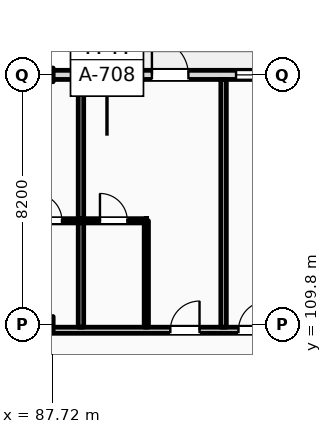
"""IFC4 building model, lengths in metres.
Left out: names, types, materials, properties, quantities, classifications, styles, units other than length and angle.
Written with IfcOpenShell. Run it as: python <this file> out.ifc"""

import sys

from ifc_helpers import new_model, si_unit, direction, frame, frame_2d, origin, origin_2d, place, context, subcontext, project, spatial, rectangle, i_section, extrude, element, fill, save


model = new_model("IFC4")
c1 = context("Model", 3, precision=1e-05, world=origin(), true_north=direction((0.0, 1.0)))
c2 = subcontext(c1, "Body", "Model", "MODEL_VIEW")
j1 = project(units=[si_unit("LENGTHUNIT", "METRE"), si_unit("PLANEANGLEUNIT", "RADIAN")], contexts=[c1])
p1 = place(None, origin())
s1 = spatial("IfcSite", under=j1, at=p1, CompositionType="ELEMENT")
p2 = place(p1, origin())
s2 = spatial("IfcBuilding", under=s1, at=p2, CompositionType="ELEMENT")
p3 = place(p2, frame((0.0, 0.0, 28.2)))
s3 = spatial("IfcBuildingStorey", under=s2, at=p3, CompositionType="ELEMENT", Elevation=28.2)
p4 = place(p3, frame((87.6, 109.8, 0.0), z_axis=(0.0, 0.0, 1.0), x_axis=(1.0, 0.0, 0.0)))
e1 = element("IfcColumn", 1, at=p4, inside=s3, PredefinedType="COLUMN", context=c2, shape_type="SweptSolid", body=[
    extrude(i_section(OverallWidth=0.3, OverallDepth=0.5, WebThickness=0.014, FlangeThickness=0.028, FilletRadius=0.027, at=origin_2d()), origin(), (0.0, 0.0, 1.0), 3.6),
])
p5 = place(p3, frame((87.6, 118.0, 0.0), z_axis=(0.0, 0.0, 1.0), x_axis=(1.0, 0.0, 0.0)))
e2 = element("IfcColumn", 2, at=p5, inside=s3, PredefinedType="COLUMN", context=c2, shape_type="SweptSolid", body=[
    extrude(i_section(OverallWidth=0.3, OverallDepth=0.45, WebThickness=0.014, FlangeThickness=0.026, FilletRadius=0.027, at=origin_2d()), origin(), (0.0, 0.0, 1.0), 3.6),
])
p6 = place(p3, frame((22.5, 118.0, 0.0), z_axis=(0.0, 0.0, 1.0), x_axis=(1.0, 0.0, 0.0)))
e3 = element("IfcWall", 3, at=p6, inside=s3, PredefinedType="STANDARD", context=c2, shape_type="SweptSolid", body=[
    extrude(rectangle(XDim=97.5, YDim=0.3, at=frame_2d((48.75, 0.0))), origin(), (0.0, 0.0, 1.0), 2.8),
])
p7 = place(p6, frame((0.91, 0.0, 0.9)))
e4 = element("IfcOpeningElement", 4, at=p7, cuts=e3, PredefinedType="OPENING", context=c2, shape_type="SweptSolid", body=[
    extrude(rectangle(XDim=0.9, YDim=1.72, at=frame_2d((0.45, 0.86))), frame((0.0, 0.16, 0.0), z_axis=(0.0, -1.0, 0.0), x_axis=(1.0, 0.0, 0.0)), (0.0, 0.0, 1.0), 0.32),
])
p8 = place(p6, frame((6.561, 0.0, 0.0)))
e5 = element("IfcOpeningElement", 5, at=p8, cuts=e3, PredefinedType="OPENING", context=c2, shape_type="SweptSolid", body=[
    extrude(rectangle(XDim=1.2, YDim=2.25, at=frame_2d((0.6, 1.125))), frame((0.0, 0.16, 0.0), z_axis=(0.0, -1.0, 0.0), x_axis=(1.0, 0.0, 0.0)), (0.0, 0.0, 1.0), 0.32),
])
p9 = place(p6, frame((11.477, 0.0, 0.9)))
e6 = element("IfcOpeningElement", 6, at=p9, cuts=e3, PredefinedType="OPENING", context=c2, shape_type="SweptSolid", body=[
    extrude(rectangle(XDim=1.1, YDim=1.5, at=frame_2d((0.55, 0.75))), frame((0.0, 0.16, 0.0), z_axis=(0.0, -1.0, 0.0), x_axis=(1.0, 0.0, 0.0)), (0.0, 0.0, 1.0), 0.32),
])
p10 = place(p6, frame((15.194, 0.0, 0.9)))
e7 = element("IfcOpeningElement", 7, at=p10, cuts=e3, PredefinedType="OPENING", context=c2, shape_type="SweptSolid", body=[
    extrude(rectangle(XDim=1.25, YDim=1.6, at=frame_2d((0.625, 0.8))), frame((0.0, 0.16, 0.0), z_axis=(0.0, -1.0, 0.0), x_axis=(1.0, 0.0, 0.0)), (0.0, 0.0, 1.0), 0.32),
])
p11 = place(p6, frame((19.509, 0.0, 0.9)))
e8 = element("IfcOpeningElement", 8, at=p11, cuts=e3, PredefinedType="OPENING", context=c2, shape_type="SweptSolid", body=[
    extrude(rectangle(XDim=1.4, YDim=1.7, at=frame_2d((0.7, 0.85))), frame((0.0, 0.16, 0.0), z_axis=(0.0, -1.0, 0.0), x_axis=(1.0, 0.0, 0.0)), (0.0, 0.0, 1.0), 0.32),
])
p12 = place(p6, frame((23.258, 0.0, 0.0)))
e9 = element("IfcOpeningElement", 9, at=p12, cuts=e3, PredefinedType="OPENING", context=c2, shape_type="SweptSolid", body=[
    extrude(rectangle(XDim=1.2, YDim=2.25, at=frame_2d((0.6, 1.125))), frame((0.0, 0.16, 0.0), z_axis=(0.0, -1.0, 0.0), x_axis=(1.0, 0.0, 0.0)), (0.0, 0.0, 1.0), 0.32),
])
p13 = place(p6, frame((28.115, 0.0, 0.9)))
e10 = element("IfcOpeningElement", 10, at=p13, cuts=e3, PredefinedType="OPENING", context=c2, shape_type="SweptSolid", body=[
    extrude(rectangle(XDim=1.75, YDim=1.72, at=frame_2d((0.875, 0.86))), frame((0.0, 0.16, 0.0), z_axis=(0.0, -1.0, 0.0), x_axis=(1.0, 0.0, 0.0)), (0.0, 0.0, 1.0), 0.32),
])
p14 = place(p6, frame((31.582, 0.0, 0.9)))
e11 = element("IfcOpeningElement", 11, at=p14, cuts=e3, PredefinedType="OPENING", context=c2, shape_type="SweptSolid", body=[
    extrude(rectangle(XDim=1.35, YDim=1.72, at=frame_2d((0.675, 0.86))), frame((0.0, 0.16, 0.0), z_axis=(0.0, -1.0, 0.0), x_axis=(1.0, 0.0, 0.0)), (0.0, 0.0, 1.0), 0.32),
])
p15 = place(p6, frame((37.379, 0.0, 0.0)))
e12 = element("IfcOpeningElement", 12, at=p15, cuts=e3, PredefinedType="OPENING", context=c2, shape_type="SweptSolid", body=[
    extrude(rectangle(XDim=1.2, YDim=2.25, at=frame_2d((0.6, 1.125))), frame((0.0, 0.16, 0.0), z_axis=(0.0, -1.0, 0.0), x_axis=(1.0, 0.0, 0.0)), (0.0, 0.0, 1.0), 0.32),
])
p16 = place(p6, frame((42.663, 0.0, 0.9)))
e13 = element("IfcOpeningElement", 13, at=p16, cuts=e3, PredefinedType="OPENING", context=c2, shape_type="SweptSolid", body=[
    extrude(rectangle(XDim=1.35, YDim=1.72, at=frame_2d((0.675, 0.86))), frame((0.0, 0.16, 0.0), z_axis=(0.0, -1.0, 0.0), x_axis=(1.0, 0.0, 0.0)), (0.0, 0.0, 1.0), 0.32),
])
p17 = place(p6, frame((45.119, 0.0, 0.9)))
e14 = element("IfcOpeningElement", 14, at=p17, cuts=e3, PredefinedType="OPENING", context=c2, shape_type="SweptSolid", body=[
    extrude(rectangle(XDim=2.871, YDim=1.72, at=frame_2d((1.436, 0.86))), frame((0.0, 0.16, 0.0), z_axis=(0.0, -1.0, 0.0), x_axis=(1.0, 0.0, 0.0)), (0.0, 0.0, 1.0), 0.32),
])
p18 = place(p6, frame((50.41, 0.0, 0.9)))
e15 = element("IfcOpeningElement", 15, at=p18, cuts=e3, PredefinedType="OPENING", context=c2, shape_type="SweptSolid", body=[
    extrude(rectangle(XDim=1.8, YDim=1.72, at=frame_2d((0.9, 0.86))), frame((0.0, 0.16, 0.0), z_axis=(0.0, -1.0, 0.0), x_axis=(1.0, 0.0, 0.0)), (0.0, 0.0, 1.0), 0.32),
])
p19 = place(p6, frame((54.375, 0.0, 0.0)))
e16 = element("IfcOpeningElement", 16, at=p19, cuts=e3, PredefinedType="OPENING", context=c2, shape_type="SweptSolid", body=[
    extrude(rectangle(XDim=1.2, YDim=2.25, at=frame_2d((0.6, 1.125))), frame((0.0, 0.16, 0.0), z_axis=(0.0, -1.0, 0.0), x_axis=(1.0, 0.0, 0.0)), (0.0, 0.0, 1.0), 0.32),
])
p20 = place(p6, frame((59.052, 0.0, 0.9)))
e17 = element("IfcOpeningElement", 17, at=p20, cuts=e3, PredefinedType="OPENING", context=c2, shape_type="SweptSolid", body=[
    extrude(rectangle(XDim=1.35, YDim=1.72, at=frame_2d((0.675, 0.86))), frame((0.0, 0.16, 0.0), z_axis=(0.0, -1.0, 0.0), x_axis=(1.0, 0.0, 0.0)), (0.0, 0.0, 1.0), 0.32),
])
p21 = place(p6, frame((62.768, 0.0, 0.9)))
e18 = element("IfcOpeningElement", 18, at=p21, cuts=e3, PredefinedType="OPENING", context=c2, shape_type="SweptSolid", body=[
    extrude(rectangle(XDim=1.5, YDim=1.72, at=frame_2d((0.75, 0.86))), frame((0.0, 0.16, 0.0), z_axis=(0.0, -1.0, 0.0), x_axis=(1.0, 0.0, 0.0)), (0.0, 0.0, 1.0), 0.32),
])
p22 = place(p6, frame((68.498, 0.0, 0.0)))
e19 = element("IfcOpeningElement", 19, at=p22, cuts=e3, PredefinedType="OPENING", context=c2, shape_type="SweptSolid", body=[
    extrude(rectangle(XDim=1.2, YDim=2.25, at=frame_2d((0.6, 1.125))), frame((0.0, 0.16, 0.0), z_axis=(0.0, -1.0, 0.0), x_axis=(1.0, 0.0, 0.0)), (0.0, 0.0, 1.0), 0.32),
])
p23 = place(p6, frame((71.265, 0.0, 0.9)))
e20 = element("IfcOpeningElement", 20, at=p23, cuts=e3, PredefinedType="OPENING", context=c2, shape_type="SweptSolid", body=[
    extrude(rectangle(XDim=0.9, YDim=1.72, at=frame_2d((0.45, 0.86))), frame((0.0, 0.16, 0.0), z_axis=(0.0, -1.0, 0.0), x_axis=(1.0, 0.0, 0.0)), (0.0, 0.0, 1.0), 0.32),
])
p24 = place(p6, frame((76.316, 0.0, 0.9)))
e21 = element("IfcOpeningElement", 21, at=p24, cuts=e3, PredefinedType="OPENING", context=c2, shape_type="SweptSolid", body=[
    extrude(rectangle(XDim=1.95, YDim=1.72, at=frame_2d((0.975, 0.86))), frame((0.0, 0.16, 0.0), z_axis=(0.0, -1.0, 0.0), x_axis=(1.0, 0.0, 0.0)), (0.0, 0.0, 1.0), 0.32),
])
p25 = place(p6, frame((81.632, 0.0, 0.9)))
e22 = element("IfcOpeningElement", 22, at=p25, cuts=e3, PredefinedType="OPENING", context=c2, shape_type="SweptSolid", body=[
    extrude(rectangle(XDim=1.35, YDim=1.72, at=frame_2d((0.675, 0.86))), frame((0.0, 0.16, 0.0), z_axis=(0.0, -1.0, 0.0), x_axis=(1.0, 0.0, 0.0)), (0.0, 0.0, 1.0), 0.32),
])
p26 = place(p6, frame((84.948, 0.0, 0.9)))
e23 = element("IfcOpeningElement", 23, at=p26, cuts=e3, PredefinedType="OPENING", context=c2, shape_type="SweptSolid", body=[
    extrude(rectangle(XDim=2.25, YDim=1.72, at=frame_2d((1.125, 0.86))), frame((0.0, 0.16, 0.0), z_axis=(0.0, -1.0, 0.0), x_axis=(1.0, 0.0, 0.0)), (0.0, 0.0, 1.0), 0.32),
])
p27 = place(p6, frame((90.063, 0.0, 0.9)))
e24 = element("IfcOpeningElement", 24, at=p27, cuts=e3, PredefinedType="OPENING", context=c2, shape_type="SweptSolid", body=[
    extrude(rectangle(XDim=1.8, YDim=1.72, at=frame_2d((0.9, 0.86))), frame((0.0, 0.16, 0.0), z_axis=(0.0, -1.0, 0.0), x_axis=(1.0, 0.0, 0.0)), (0.0, 0.0, 1.0), 0.32),
])
p28 = place(p6, frame((93.529, 0.0, 0.9)))
e25 = element("IfcOpeningElement", 25, at=p28, cuts=e3, PredefinedType="OPENING", context=c2, shape_type="SweptSolid", body=[
    extrude(rectangle(XDim=2.55, YDim=1.72, at=frame_2d((1.275, 0.86))), frame((0.0, 0.16, 0.0), z_axis=(0.0, -1.0, 0.0), x_axis=(1.0, 0.0, 0.0)), (0.0, 0.0, 1.0), 0.32),
])
p29 = place(p3, frame((10.65, 109.6, 0.0), z_axis=(0.0, 0.0, 1.0), x_axis=(1.0, 0.0, 0.0)))
e26 = element("IfcWall", 26, at=p29, inside=s3, PredefinedType="PARTITIONING", context=c2, shape_type="SweptSolid", body=[
    extrude(rectangle(XDim=109.21, YDim=0.2, at=frame_2d((54.605, 0.0))), origin(), (0.0, 0.0, 1.0), 2.8),
])
p30 = place(p29, frame((12.611, 0.0, 0.0)))
e27 = element("IfcOpeningElement", 27, at=p30, cuts=e26, PredefinedType="OPENING", context=c2, shape_type="SweptSolid", body=[
    extrude(rectangle(XDim=1.02, YDim=2.2, at=frame_2d((0.51, 1.1))), frame((0.0, 0.11, 0.0), z_axis=(0.0, -1.0, 0.0), x_axis=(1.0, 0.0, 0.0)), (0.0, 0.0, 1.0), 0.22),
])
p31 = place(p29, frame((19.451, 0.0, 0.0)))
e28 = element("IfcOpeningElement", 28, at=p31, cuts=e26, PredefinedType="OPENING", context=c2, shape_type="SweptSolid", body=[
    extrude(rectangle(XDim=1.02, YDim=2.2, at=frame_2d((0.51, 1.1))), frame((0.0, 0.11, 0.0), z_axis=(0.0, -1.0, 0.0), x_axis=(1.0, 0.0, 0.0)), (0.0, 0.0, 1.0), 0.22),
])
p32 = place(p29, frame((23.842, 0.0, 0.0)))
e29 = element("IfcOpeningElement", 29, at=p32, cuts=e26, PredefinedType="OPENING", context=c2, shape_type="SweptSolid", body=[
    extrude(rectangle(XDim=1.02, YDim=2.2, at=frame_2d((0.51, 1.1))), frame((0.0, 0.11, 0.0), z_axis=(0.0, -1.0, 0.0), x_axis=(1.0, 0.0, 0.0)), (0.0, 0.0, 1.0), 0.22),
])
p33 = place(p29, frame((26.084, 0.0, 0.0)))
e30 = element("IfcOpeningElement", 30, at=p33, cuts=e26, PredefinedType="OPENING", context=c2, shape_type="SweptSolid", body=[
    extrude(rectangle(XDim=1.02, YDim=2.2, at=frame_2d((0.51, 1.1))), frame((0.0, 0.11, 0.0), z_axis=(0.0, -1.0, 0.0), x_axis=(1.0, 0.0, 0.0)), (0.0, 0.0, 1.0), 0.22),
])
p34 = place(p29, frame((32.655, 0.0, 0.0)))
e31 = element("IfcOpeningElement", 31, at=p34, cuts=e26, PredefinedType="OPENING", context=c2, shape_type="SweptSolid", body=[
    extrude(rectangle(XDim=0.96, YDim=2.2, at=frame_2d((0.48, 1.1))), frame((0.0, 0.11, 0.0), z_axis=(0.0, -1.0, 0.0), x_axis=(1.0, 0.0, 0.0)), (0.0, 0.0, 1.0), 0.22),
])
p35 = place(p29, frame((34.895, 0.0, 0.0)))
e32 = element("IfcOpeningElement", 32, at=p35, cuts=e26, PredefinedType="OPENING", context=c2, shape_type="SweptSolid", body=[
    extrude(rectangle(XDim=0.96, YDim=2.2, at=frame_2d((0.48, 1.1))), frame((0.0, 0.11, 0.0), z_axis=(0.0, -1.0, 0.0), x_axis=(1.0, 0.0, 0.0)), (0.0, 0.0, 1.0), 0.22),
])
p36 = place(p29, frame((41.436, 0.0, 0.0)))
e33 = element("IfcOpeningElement", 33, at=p36, cuts=e26, PredefinedType="OPENING", context=c2, shape_type="SweptSolid", body=[
    extrude(rectangle(XDim=0.96, YDim=2.2, at=frame_2d((0.48, 1.1))), frame((0.0, 0.11, 0.0), z_axis=(0.0, -1.0, 0.0), x_axis=(1.0, 0.0, 0.0)), (0.0, 0.0, 1.0), 0.22),
])
p37 = place(p29, frame((43.427, 0.0, 0.0)))
e34 = element("IfcOpeningElement", 34, at=p37, cuts=e26, PredefinedType="OPENING", context=c2, shape_type="SweptSolid", body=[
    extrude(rectangle(XDim=0.96, YDim=2.2, at=frame_2d((0.48, 1.1))), frame((0.0, 0.11, 0.0), z_axis=(0.0, -1.0, 0.0), x_axis=(1.0, 0.0, 0.0)), (0.0, 0.0, 1.0), 0.22),
])
p38 = place(p29, frame((50.218, 0.0, 0.0)))
e35 = element("IfcOpeningElement", 35, at=p38, cuts=e26, PredefinedType="OPENING", context=c2, shape_type="SweptSolid", body=[
    extrude(rectangle(XDim=0.96, YDim=2.2, at=frame_2d((0.48, 1.1))), frame((0.0, 0.11, 0.0), z_axis=(0.0, -1.0, 0.0), x_axis=(1.0, 0.0, 0.0)), (0.0, 0.0, 1.0), 0.22),
])
p39 = place(p29, frame((54.859, 0.0, 0.0)))
e36 = element("IfcOpeningElement", 36, at=p39, cuts=e26, PredefinedType="OPENING", context=c2, shape_type="SweptSolid", body=[
    extrude(rectangle(XDim=0.96, YDim=2.2, at=frame_2d((0.48, 1.1))), frame((0.0, 0.11, 0.0), z_axis=(0.0, -1.0, 0.0), x_axis=(1.0, 0.0, 0.0)), (0.0, 0.0, 1.0), 0.22),
])
p40 = place(p29, frame((59.0, 0.0, 0.0)))
e37 = element("IfcOpeningElement", 37, at=p40, cuts=e26, PredefinedType="OPENING", context=c2, shape_type="SweptSolid", body=[
    extrude(rectangle(XDim=0.96, YDim=2.2, at=frame_2d((0.48, 1.1))), frame((0.0, 0.11, 0.0), z_axis=(0.0, -1.0, 0.0), x_axis=(1.0, 0.0, 0.0)), (0.0, 0.0, 1.0), 0.22),
])
p41 = place(p29, frame((63.39, 0.0, 0.0)))
e38 = element("IfcOpeningElement", 38, at=p41, cuts=e26, PredefinedType="OPENING", context=c2, shape_type="SweptSolid", body=[
    extrude(rectangle(XDim=0.96, YDim=2.2, at=frame_2d((0.48, 1.1))), frame((0.0, 0.11, 0.0), z_axis=(0.0, -1.0, 0.0), x_axis=(1.0, 0.0, 0.0)), (0.0, 0.0, 1.0), 0.22),
])
p42 = place(p29, frame((65.631, 0.0, 0.0)))
e39 = element("IfcOpeningElement", 39, at=p42, cuts=e26, PredefinedType="OPENING", context=c2, shape_type="SweptSolid", body=[
    extrude(rectangle(XDim=0.96, YDim=2.2, at=frame_2d((0.48, 1.1))), frame((0.0, 0.11, 0.0), z_axis=(0.0, -1.0, 0.0), x_axis=(1.0, 0.0, 0.0)), (0.0, 0.0, 1.0), 0.22),
])
p43 = place(p29, frame((72.172, 0.0, 0.0)))
e40 = element("IfcOpeningElement", 40, at=p43, cuts=e26, PredefinedType="OPENING", context=c2, shape_type="SweptSolid", body=[
    extrude(rectangle(XDim=0.96, YDim=2.2, at=frame_2d((0.48, 1.1))), frame((0.0, 0.11, 0.0), z_axis=(0.0, -1.0, 0.0), x_axis=(1.0, 0.0, 0.0)), (0.0, 0.0, 1.0), 0.22),
])
p44 = place(p29, frame((74.413, 0.0, 0.0)))
e41 = element("IfcOpeningElement", 41, at=p44, cuts=e26, PredefinedType="OPENING", context=c2, shape_type="SweptSolid", body=[
    extrude(rectangle(XDim=0.96, YDim=2.2, at=frame_2d((0.48, 1.1))), frame((0.0, 0.11, 0.0), z_axis=(0.0, -1.0, 0.0), x_axis=(1.0, 0.0, 0.0)), (0.0, 0.0, 1.0), 0.22),
])
p45 = place(p29, frame((80.954, 0.0, 0.0)))
e42 = element("IfcOpeningElement", 42, at=p45, cuts=e26, PredefinedType="OPENING", context=c2, shape_type="SweptSolid", body=[
    extrude(rectangle(XDim=0.96, YDim=2.2, at=frame_2d((0.48, 1.1))), frame((0.0, 0.11, 0.0), z_axis=(0.0, -1.0, 0.0), x_axis=(1.0, 0.0, 0.0)), (0.0, 0.0, 1.0), 0.22),
])
p46 = place(p29, frame((83.195, 0.0, 0.0)))
e43 = element("IfcOpeningElement", 43, at=p46, cuts=e26, PredefinedType="OPENING", context=c2, shape_type="SweptSolid", body=[
    extrude(rectangle(XDim=0.96, YDim=2.2, at=frame_2d((0.48, 1.1))), frame((0.0, 0.11, 0.0), z_axis=(0.0, -1.0, 0.0), x_axis=(1.0, 0.0, 0.0)), (0.0, 0.0, 1.0), 0.22),
])
p47 = place(p29, frame((89.735, 0.0, 0.0)))
e44 = element("IfcOpeningElement", 44, at=p47, cuts=e26, PredefinedType="OPENING", context=c2, shape_type="SweptSolid", body=[
    extrude(rectangle(XDim=0.96, YDim=2.2, at=frame_2d((0.48, 1.1))), frame((0.0, 0.11, 0.0), z_axis=(0.0, -1.0, 0.0), x_axis=(1.0, 0.0, 0.0)), (0.0, 0.0, 1.0), 0.22),
])
p48 = place(p29, frame((94.126, 0.0, 0.0)))
e45 = element("IfcOpeningElement", 45, at=p48, cuts=e26, PredefinedType="OPENING", context=c2, shape_type="SweptSolid", body=[
    extrude(rectangle(XDim=0.96, YDim=2.2, at=frame_2d((0.48, 1.1))), frame((0.0, 0.11, 0.0), z_axis=(0.0, -1.0, 0.0), x_axis=(1.0, 0.0, 0.0)), (0.0, 0.0, 1.0), 0.22),
])
p49 = place(p29, frame((98.517, 0.0, 0.0)))
e46 = element("IfcOpeningElement", 46, at=p49, cuts=e26, PredefinedType="OPENING", context=c2, shape_type="SweptSolid", body=[
    extrude(rectangle(XDim=0.96, YDim=2.2, at=frame_2d((0.48, 1.1))), frame((0.0, 0.11, 0.0), z_axis=(0.0, -1.0, 0.0), x_axis=(1.0, 0.0, 0.0)), (0.0, 0.0, 1.0), 0.22),
])
p50 = place(p29, frame((102.908, 0.0, 0.0)))
e47 = element("IfcOpeningElement", 47, at=p50, cuts=e26, PredefinedType="OPENING", context=c2, shape_type="SweptSolid", body=[
    extrude(rectangle(XDim=0.96, YDim=2.2, at=frame_2d((0.48, 1.1))), frame((0.0, 0.11, 0.0), z_axis=(0.0, -1.0, 0.0), x_axis=(1.0, 0.0, 0.0)), (0.0, 0.0, 1.0), 0.22),
])
p51 = place(p29, frame((105.099, 0.0, 0.0)))
e48 = element("IfcOpeningElement", 48, at=p51, cuts=e26, PredefinedType="OPENING", context=c2, shape_type="SweptSolid", body=[
    extrude(rectangle(XDim=0.96, YDim=2.2, at=frame_2d((0.48, 1.1))), frame((0.0, 0.11, 0.0), z_axis=(0.0, -1.0, 0.0), x_axis=(1.0, 0.0, 0.0)), (0.0, 0.0, 1.0), 0.22),
])
p52 = place(p29, frame((2.716, 0.0, 0.0)))
e49 = element("IfcOpeningElement", 49, at=p52, cuts=e26, PredefinedType="OPENING", context=c2, shape_type="SweptSolid", body=[
    extrude(rectangle(XDim=1.35, YDim=2.25, at=frame_2d((0.675, 1.125))), frame((0.0, 0.11, 0.0), z_axis=(0.0, -1.0, 0.0), x_axis=(1.0, 0.0, 0.0)), (0.0, 0.0, 1.0), 0.22),
])
p53 = place(p29, frame((6.65, 0.0, 0.0)))
e50 = element("IfcOpeningElement", 50, at=p53, cuts=e26, PredefinedType="OPENING", context=c2, shape_type="SweptSolid", body=[
    extrude(rectangle(XDim=1.35, YDim=2.25, at=frame_2d((0.675, 1.125))), frame((0.0, 0.11, 0.0), z_axis=(0.0, -1.0, 0.0), x_axis=(1.0, 0.0, 0.0)), (0.0, 0.0, 1.0), 0.22),
])
p54 = place(p29, frame((10.583, 0.0, 0.0)))
e51 = element("IfcOpeningElement", 51, at=p54, cuts=e26, PredefinedType="OPENING", context=c2, shape_type="SweptSolid", body=[
    extrude(rectangle(XDim=1.35, YDim=2.25, at=frame_2d((0.675, 1.125))), frame((0.0, 0.11, 0.0), z_axis=(0.0, -1.0, 0.0), x_axis=(1.0, 0.0, 0.0)), (0.0, 0.0, 1.0), 0.22),
])
p55 = place(p3, frame((88.664, 109.7, 0.0), z_axis=(0.0, 0.0, 1.0), x_axis=(0.0, 1.0, 0.0)))
e52 = element("IfcWall", 52, at=p55, inside=s3, PredefinedType="PARTITIONING", context=c2, shape_type="SweptSolid", body=[
    extrude(rectangle(XDim=8.15, YDim=0.18, at=frame_2d((4.075, 0.0))), origin(), (0.0, 0.0, 1.0), 3.36),
])
p56 = place(p3, frame((86.514, 113.2, 0.0), z_axis=(0.0, 0.0, 1.0), x_axis=(1.0, 0.0, 0.0)))
e53 = element("IfcWall", 53, at=p56, inside=s3, PredefinedType="PARTITIONING", context=c2, shape_type="SweptSolid", body=[
    extrude(rectangle(XDim=2.15, YDim=0.14, at=frame_2d((1.075, 0.0))), origin(), (0.0, 0.0, 1.0), 3.36),
])
p57 = place(p56, frame((0.625, 0.0, 0.0)))
e54 = element("IfcOpeningElement", 54, at=p57, cuts=e53, PredefinedType="OPENING", context=c2, shape_type="SweptSolid", body=[
    extrude(rectangle(XDim=0.9, YDim=2.1, at=frame_2d((0.45, 1.05))), frame((0.0, 0.08, 0.0), z_axis=(0.0, -1.0, 0.0), x_axis=(1.0, 0.0, 0.0)), (0.0, 0.0, 1.0), 0.16),
])
p58 = place(p3, frame((93.355, 109.7, 0.0), z_axis=(0.0, 0.0, 1.0), x_axis=(0.0, 1.0, 0.0)))
e55 = element("IfcWall", 55, at=p58, inside=s3, PredefinedType="PARTITIONING", context=c2, shape_type="SweptSolid", body=[
    extrude(rectangle(XDim=8.15, YDim=0.18, at=frame_2d((4.075, 0.0))), origin(), (0.0, 0.0, 1.0), 3.36),
])
p59 = place(p3, frame((90.814, 109.7, 0.0), z_axis=(0.0, 0.0, 1.0), x_axis=(0.0, 1.0, 0.0)))
e56 = element("IfcWall", 56, at=p59, inside=s3, PredefinedType="PARTITIONING", context=c2, shape_type="SweptSolid", body=[
    extrude(rectangle(XDim=3.5, YDim=0.14, at=frame_2d((1.75, 0.0))), origin(), (0.0, 0.0, 1.0), 3.36),
])
p60 = place(p3, frame((88.664, 113.2, 0.0), z_axis=(0.0, 0.0, 1.0), x_axis=(1.0, 0.0, 0.0)))
e57 = element("IfcWall", 57, at=p60, inside=s3, PredefinedType="PARTITIONING", context=c2, shape_type="SweptSolid", body=[
    extrude(rectangle(XDim=2.15, YDim=0.14, at=frame_2d((1.075, 0.0))), origin(), (0.0, 0.0, 1.0), 3.36),
])
p61 = place(p60, frame((0.625, 0.0, 0.0)))
e58 = element("IfcOpeningElement", 58, at=p61, cuts=e57, PredefinedType="OPENING", context=c2, shape_type="SweptSolid", body=[
    extrude(rectangle(XDim=0.9, YDim=2.1, at=frame_2d((0.45, 1.05))), frame((0.0, 0.08, 0.0), z_axis=(0.0, -1.0, 0.0), x_axis=(1.0, 0.0, 0.0)), (0.0, 0.0, 1.0), 0.16),
])
p62 = place(p22, origin())
e59 = element("IfcDoor", 59, at=p62, inside=s3, OperationType="SINGLE_SWING_LEFT", PredefinedType="DOOR", context=c2, shape_type="SweptSolid", body=[
    extrude(rectangle(XDim=1.2, YDim=2.25, at=frame_2d((0.6, 1.125))), frame((0.0, 0.025, 0.0), z_axis=(0.0, -1.0, 0.0), x_axis=(1.0, 0.0, 0.0)), (0.0, 0.0, 1.0), 0.05),
])
fill(e19, e59)
p63 = place(p23, origin())
e60 = element("IfcWindow", 60, at=p63, inside=s3, PartitioningType="DOUBLE_PANEL_VERTICAL", PredefinedType="WINDOW", context=c2, shape_type="SweptSolid", body=[
    extrude(rectangle(XDim=0.9, YDim=1.72, at=frame_2d((0.45, 0.86))), frame((0.0, 0.03, 0.0), z_axis=(0.0, -1.0, 0.0), x_axis=(1.0, 0.0, 0.0)), (0.0, 0.0, 1.0), 0.06),
])
fill(e20, e60)
p64 = place(p57, origin())
e61 = element("IfcDoor", 61, at=p64, inside=s3, OperationType="SINGLE_SWING_LEFT", PredefinedType="DOOR", context=c2, shape_type="SweptSolid", body=[
    extrude(rectangle(XDim=0.9, YDim=2.1, at=frame_2d((0.45, 1.05))), frame((0.0, 0.025, 0.0), z_axis=(0.0, -1.0, 0.0), x_axis=(1.0, 0.0, 0.0)), (0.0, 0.0, 1.0), 0.05),
])
fill(e54, e61)
p65 = place(p45, origin())
e62 = element("IfcDoor", 62, at=p65, inside=s3, OperationType="SINGLE_SWING_RIGHT", PredefinedType="DOOR", context=c2, shape_type="SweptSolid", body=[
    extrude(rectangle(XDim=0.96, YDim=2.2, at=frame_2d((0.48, 1.1))), frame((0.0, 0.025, 0.0), z_axis=(0.0, -1.0, 0.0), x_axis=(1.0, 0.0, 0.0)), (0.0, 0.0, 1.0), 0.05),
])
fill(e42, e62)
p66 = place(p61, origin())
e63 = element("IfcDoor", 63, at=p66, inside=s3, OperationType="SINGLE_SWING_LEFT", PredefinedType="DOOR", context=c2, shape_type="SweptSolid", body=[
    extrude(rectangle(XDim=0.9, YDim=2.1, at=frame_2d((0.45, 1.05))), frame((0.0, 0.025, 0.0), z_axis=(0.0, -1.0, 0.0), x_axis=(1.0, 0.0, 0.0)), (0.0, 0.0, 1.0), 0.05),
])
fill(e58, e63)
p67 = place(p46, origin())
e64 = element("IfcDoor", 64, at=p67, inside=s3, OperationType="SINGLE_SWING_RIGHT", PredefinedType="DOOR", context=c2, shape_type="SweptSolid", body=[
    extrude(rectangle(XDim=0.96, YDim=2.2, at=frame_2d((0.48, 1.1))), frame((0.0, 0.025, 0.0), z_axis=(0.0, -1.0, 0.0), x_axis=(1.0, 0.0, 0.0)), (0.0, 0.0, 1.0), 0.05),
])
fill(e43, e64)
save(model, sys.argv[1])
